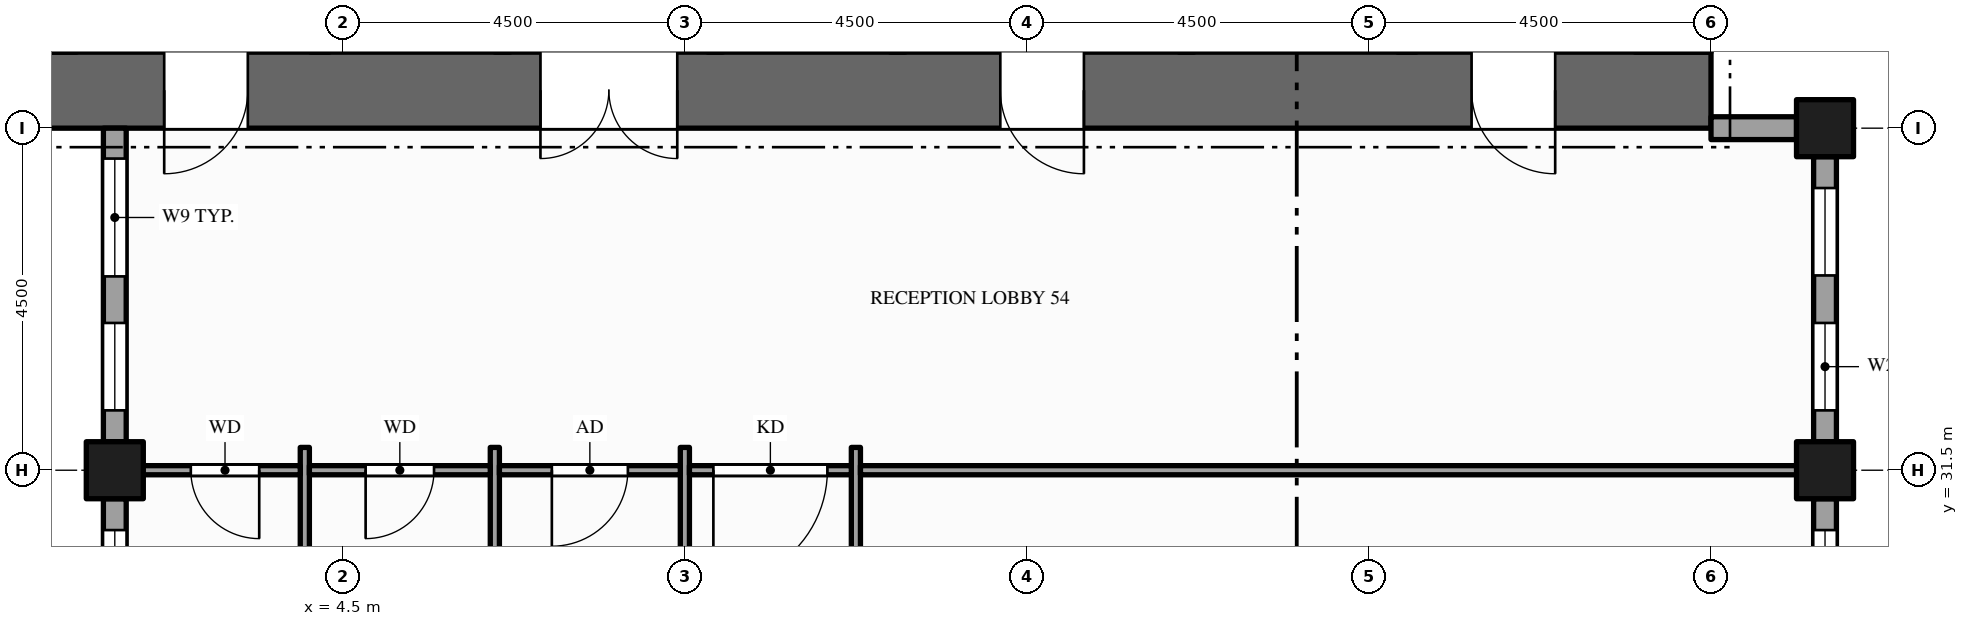
"""IFC4 building model, lengths in metres.
Left out: names, types, materials, properties, quantities, classifications, styles, units other than length and angle.
Written with IfcOpenShell. Run it as: python <this file> out.ifc"""

import sys

from ifc_helpers import new_model, si_unit, direction, frame, frame_2d, origin, origin_2d, place, context, subcontext, project, spatial, rectangle, hollow_rectangle, extrude, element, fill, save


model = new_model("IFC4")
c1 = context("Model", 3, precision=1e-05, world=origin(), true_north=direction((0.0, 1.0)))
c2 = subcontext(c1, "Body", "Model", "MODEL_VIEW")
j1 = project(units=[si_unit("LENGTHUNIT", "METRE"), si_unit("PLANEANGLEUNIT", "RADIAN")], contexts=[c1])
p1 = place(None, origin())
s1 = spatial("IfcSite", under=j1, at=p1, CompositionType="ELEMENT")
p2 = place(p1, origin())
s2 = spatial("IfcBuilding", under=s1, at=p2, CompositionType="ELEMENT")
p3 = place(p2, frame((0.0, 0.0, 199.0)))
s3 = spatial("IfcBuildingStorey", under=s2, at=p3, CompositionType="ELEMENT", Elevation=199.0)
p4 = place(p3, frame((0.0, 36.5, -0.15), z_axis=(0.0, 0.0, 1.0), x_axis=(1.0, 0.0, 0.0)))
e1 = element("IfcWall", 1, at=p4, inside=s3, PredefinedType="SHEAR", context=c2, shape_type="SweptSolid", body=[
    extrude(rectangle(XDim=22.5, YDim=1.0, at=frame_2d((11.25, 0.0))), origin(), (0.0, 0.0, 1.0), 4.0),
])
p5 = place(p4, frame((7.1, 0.0, 0.15)))
e2 = element("IfcOpeningElement", 2, at=p5, cuts=e1, PredefinedType="OPENING", context=c2, shape_type="SweptSolid", body=[
    extrude(rectangle(XDim=1.8, YDim=2.1, at=frame_2d((0.9, 1.05))), frame((0.0, 0.51, 0.0), z_axis=(0.0, -1.0, 0.0), x_axis=(1.0, 0.0, 0.0)), (0.0, 0.0, 1.0), 1.02),
])
p6 = place(p4, frame((13.15, 0.0, 0.15)))
e3 = element("IfcOpeningElement", 3, at=p6, cuts=e1, PredefinedType="OPENING", context=c2, shape_type="SweptSolid", body=[
    extrude(rectangle(XDim=1.1, YDim=2.1, at=frame_2d((0.55, 1.05))), frame((0.0, 0.51, 0.0), z_axis=(0.0, -1.0, 0.0), x_axis=(1.0, 0.0, 0.0)), (0.0, 0.0, 1.0), 1.02),
])
p7 = place(p4, frame((2.15, 0.0, 0.15)))
e4 = element("IfcOpeningElement", 4, at=p7, cuts=e1, PredefinedType="OPENING", context=c2, shape_type="SweptSolid", body=[
    extrude(rectangle(XDim=1.1, YDim=2.1, at=frame_2d((0.55, 1.05))), frame((0.0, 0.51, 0.0), z_axis=(0.0, -1.0, 0.0), x_axis=(1.0, 0.0, 0.0)), (0.0, 0.0, 1.0), 1.02),
])
p8 = place(p4, frame((19.35, 0.0, 0.15)))
e5 = element("IfcOpeningElement", 5, at=p8, cuts=e1, PredefinedType="OPENING", context=c2, shape_type="SweptSolid", body=[
    extrude(rectangle(XDim=1.1, YDim=2.1, at=frame_2d((0.55, 1.05))), frame((0.0, 0.51, 0.0), z_axis=(0.0, -1.0, 0.0), x_axis=(1.0, 0.0, 0.0)), (0.0, 0.0, 1.0), 1.02),
])
for number, where, z_axis, x_axis in (
    (6, (1.5, 31.5, -0.15), (0.0, 0.0, 1.0), (1.0, 0.0, 0.0)),
    (7, (24.0, 31.5, -0.15), (0.0, 0.0, 1.0), (1.0, 0.0, 0.0)),
    (8, (24.0, 36.0, -0.15), (0.0, 0.0, 1.0), (1.0, 0.0, 0.0)),
):
    element("IfcColumn", number, at=place(p3, frame(where, z_axis=z_axis, x_axis=x_axis)), inside=s3, PredefinedType="COLUMN", context=c2, shape_type="SweptSolid", body=[
        extrude(hollow_rectangle(XDim=0.75, YDim=0.75, WallThickness=0.036, at=origin_2d()), origin(), (0.0, 0.0, 1.0), 4.0),
    ])
p9 = place(p3, frame((24.0, 25.875, 0.0), z_axis=(0.0, 0.0, 1.0), x_axis=(0.0, 1.0, 0.0)))
e9 = element("IfcWall", 9, at=p9, inside=s3, PredefinedType="STANDARD", context=c2, shape_type="SweptSolid", body=[
    extrude(rectangle(XDim=5.25, YDim=0.3, at=frame_2d((2.625, 0.0))), origin(), (0.0, 0.0, 1.0), 3.157),
])
p10 = place(p9, frame((1.425, 0.0, 0.9)))
e10 = element("IfcOpeningElement", 10, at=p10, cuts=e9, PredefinedType="OPENING", context=c2, shape_type="SweptSolid", body=[
    extrude(rectangle(XDim=1.65, YDim=2.0, at=frame_2d((0.825, 1.0))), frame((0.0, 0.16, 0.0), z_axis=(0.0, -1.0, 0.0), x_axis=(1.0, 0.0, 0.0)), (0.0, 0.0, 1.0), 0.32),
])
p11 = place(p9, frame((3.688, 0.0, 0.9)))
e11 = element("IfcOpeningElement", 11, at=p11, cuts=e9, PredefinedType="OPENING", context=c2, shape_type="SweptSolid", body=[
    extrude(rectangle(XDim=1.15, YDim=2.0, at=frame_2d((0.575, 1.0))), frame((0.0, 0.16, 0.0), z_axis=(0.0, -1.0, 0.0), x_axis=(1.0, 0.0, 0.0)), (0.0, 0.0, 1.0), 0.32),
])
p12 = place(p3, frame((24.0, 31.875, 0.0), z_axis=(0.0, 0.0, 1.0), x_axis=(0.0, 1.0, 0.0)))
e12 = element("IfcWall", 12, at=p12, inside=s3, PredefinedType="STANDARD", context=c2, shape_type="SweptSolid", body=[
    extrude(rectangle(XDim=3.75, YDim=0.3, at=frame_2d((1.875, 0.0))), origin(), (0.0, 0.0, 1.0), 3.157),
])
p13 = place(p12, frame((0.413, 0.0, 0.9)))
e13 = element("IfcOpeningElement", 13, at=p13, cuts=e12, PredefinedType="OPENING", context=c2, shape_type="SweptSolid", body=[
    extrude(rectangle(XDim=1.15, YDim=2.0, at=frame_2d((0.575, 1.0))), frame((0.0, 0.16, 0.0), z_axis=(0.0, -1.0, 0.0), x_axis=(1.0, 0.0, 0.0)), (0.0, 0.0, 1.0), 0.32),
])
p14 = place(p12, frame((2.188, 0.0, 0.9)))
e14 = element("IfcOpeningElement", 14, at=p14, cuts=e12, PredefinedType="OPENING", context=c2, shape_type="SweptSolid", body=[
    extrude(rectangle(XDim=1.15, YDim=2.0, at=frame_2d((0.575, 1.0))), frame((0.0, 0.16, 0.0), z_axis=(0.0, -1.0, 0.0), x_axis=(1.0, 0.0, 0.0)), (0.0, 0.0, 1.0), 0.32),
])
p15 = place(p3, frame((23.625, 36.0, 0.0), z_axis=(0.0, 0.0, 1.0), x_axis=(-1.0, 0.0, 0.0)))
e15 = element("IfcWall", 15, at=p15, inside=s3, PredefinedType="STANDARD", context=c2, shape_type="SweptSolid", body=[
    extrude(rectangle(XDim=1.125, YDim=0.3, at=frame_2d((0.562, 0.0))), origin(), (0.0, 0.0, 1.0), 2.87),
])
p16 = place(p3, frame((1.5, 36.0, 0.0), z_axis=(0.0, 0.0, 1.0), x_axis=(0.0, -1.0, 0.0)))
e16 = element("IfcWall", 16, at=p16, inside=s3, PredefinedType="STANDARD", context=c2, shape_type="SweptSolid", body=[
    extrude(rectangle(XDim=4.125, YDim=0.3, at=frame_2d((2.062, 0.0))), origin(), (0.0, 0.0, 1.0), 3.157),
])
p17 = place(p16, frame((0.4, 0.0, 0.9)))
e17 = element("IfcOpeningElement", 17, at=p17, cuts=e16, PredefinedType="OPENING", context=c2, shape_type="SweptSolid", body=[
    extrude(rectangle(XDim=1.55, YDim=2.0, at=frame_2d((0.775, 1.0))), frame((0.0, 0.16, 0.0), z_axis=(0.0, -1.0, 0.0), x_axis=(1.0, 0.0, 0.0)), (0.0, 0.0, 1.0), 0.32),
])
p18 = place(p16, frame((2.562, 0.0, 0.9)))
e18 = element("IfcOpeningElement", 18, at=p18, cuts=e16, PredefinedType="OPENING", context=c2, shape_type="SweptSolid", body=[
    extrude(rectangle(XDim=1.15, YDim=2.0, at=frame_2d((0.575, 1.0))), frame((0.0, 0.16, 0.0), z_axis=(0.0, -1.0, 0.0), x_axis=(1.0, 0.0, 0.0)), (0.0, 0.0, 1.0), 0.32),
])
p19 = place(p3, frame((1.5, 31.125, 0.0), z_axis=(0.0, 0.0, 1.0), x_axis=(0.0, -1.0, 0.0)))
e19 = element("IfcWall", 19, at=p19, inside=s3, PredefinedType="STANDARD", context=c2, shape_type="SweptSolid", body=[
    extrude(rectangle(XDim=3.75, YDim=0.3, at=frame_2d((1.875, 0.0))), origin(), (0.0, 0.0, 1.0), 3.157),
])
p20 = place(p19, frame((0.413, 0.0, 0.9)))
e20 = element("IfcOpeningElement", 20, at=p20, cuts=e19, PredefinedType="OPENING", context=c2, shape_type="SweptSolid", body=[
    extrude(rectangle(XDim=1.15, YDim=2.0, at=frame_2d((0.575, 1.0))), frame((0.0, 0.16, 0.0), z_axis=(0.0, -1.0, 0.0), x_axis=(1.0, 0.0, 0.0)), (0.0, 0.0, 1.0), 0.32),
])
p21 = place(p19, frame((2.188, 0.0, 0.9)))
e21 = element("IfcOpeningElement", 21, at=p21, cuts=e19, PredefinedType="OPENING", context=c2, shape_type="SweptSolid", body=[
    extrude(rectangle(XDim=1.15, YDim=2.0, at=frame_2d((0.575, 1.0))), frame((0.0, 0.16, 0.0), z_axis=(0.0, -1.0, 0.0), x_axis=(1.0, 0.0, 0.0)), (0.0, 0.0, 1.0), 0.32),
])
for number, where, z_axis, x_axis in (
    (22, (4.0, 26.7, 0.0), (0.0, 0.0, 1.0), (0.0, 1.0, 0.0)),
    (23, (6.5, 26.7, 0.0), (0.0, 0.0, 1.0), (0.0, 1.0, 0.0)),
):
    element("IfcWall", number, at=place(p3, frame(where, z_axis=z_axis, x_axis=x_axis)), inside=s3, PredefinedType="PARTITIONING", context=c2, shape_type="SweptSolid", body=[
        extrude(rectangle(XDim=5.1, YDim=0.12, at=frame_2d((2.55, 0.0))), origin(), (0.0, 0.0, 1.0), 3.85),
    ])
p22 = place(p3, frame((9.0, 10.95, 0.0), z_axis=(0.0, 0.0, 1.0), x_axis=(0.0, 1.0, 0.0)))
e24 = element("IfcWall", 24, at=p22, inside=s3, PredefinedType="PARTITIONING", context=c2, shape_type="SweptSolid", body=[
    extrude(rectangle(XDim=20.85, YDim=0.12, at=frame_2d((10.425, 0.0))), origin(), (0.0, 0.0, 1.0), 2.6),
])
p23 = place(p22, frame((2.05, 0.0, 0.0)))
e25 = element("IfcOpeningElement", 25, at=p23, cuts=e24, PredefinedType="OPENING", context=c2, shape_type="SweptSolid", body=[
    extrude(rectangle(XDim=1.0, YDim=2.1, at=frame_2d((0.5, 1.05))), frame((0.0, 0.07, 0.0), z_axis=(0.0, -1.0, 0.0), x_axis=(1.0, 0.0, 0.0)), (0.0, 0.0, 1.0), 0.14),
])
p24 = place(p22, frame((6.55, 0.0, 0.0)))
e26 = element("IfcOpeningElement", 26, at=p24, cuts=e24, PredefinedType="OPENING", context=c2, shape_type="SweptSolid", body=[
    extrude(rectangle(XDim=1.0, YDim=2.1, at=frame_2d((0.5, 1.05))), frame((0.0, 0.07, 0.0), z_axis=(0.0, -1.0, 0.0), x_axis=(1.0, 0.0, 0.0)), (0.0, 0.0, 1.0), 0.14),
])
p25 = place(p22, frame((12.205, 0.0, 0.0)))
e27 = element("IfcOpeningElement", 27, at=p25, cuts=e24, PredefinedType="OPENING", context=c2, shape_type="SweptSolid", body=[
    extrude(rectangle(XDim=1.0, YDim=2.1, at=frame_2d((0.5, 1.05))), frame((0.0, 0.07, 0.0), z_axis=(0.0, -1.0, 0.0), x_axis=(1.0, 0.0, 0.0)), (0.0, 0.0, 1.0), 0.14),
])
p26 = place(p3, frame((11.25, 10.95, 0.0), z_axis=(0.0, 0.0, 1.0), x_axis=(0.0, 1.0, 0.0)))
e28 = element("IfcWall", 28, at=p26, inside=s3, PredefinedType="PARTITIONING", context=c2, shape_type="SweptSolid", body=[
    extrude(rectangle(XDim=20.85, YDim=0.12, at=frame_2d((10.425, 0.0))), origin(), (0.0, 0.0, 1.0), 2.6),
])
p27 = place(p26, frame((17.8, 0.0, 0.0)))
e29 = element("IfcOpeningElement", 29, at=p27, cuts=e28, PredefinedType="OPENING", context=c2, shape_type="SweptSolid", body=[
    extrude(rectangle(XDim=1.0, YDim=2.1, at=frame_2d((0.5, 1.05))), frame((0.0, 0.07, 0.0), z_axis=(0.0, -1.0, 0.0), x_axis=(1.0, 0.0, 0.0)), (0.0, 0.0, 1.0), 0.14),
])
p28 = place(p26, frame((4.2, 0.0, 0.0)))
e30 = element("IfcOpeningElement", 30, at=p28, cuts=e28, PredefinedType="OPENING", context=c2, shape_type="SweptSolid", body=[
    extrude(rectangle(XDim=1.2, YDim=2.1, at=frame_2d((0.6, 1.05))), frame((0.0, 0.07, 0.0), z_axis=(0.0, -1.0, 0.0), x_axis=(1.0, 0.0, 0.0)), (0.0, 0.0, 1.0), 0.14),
])
p29 = place(p3, frame((1.65, 31.5, 0.0), z_axis=(0.0, 0.0, 1.0), x_axis=(1.0, 0.0, 0.0)))
e31 = element("IfcWall", 31, at=p29, inside=s3, PredefinedType="PARTITIONING", context=c2, shape_type="SweptSolid", body=[
    extrude(rectangle(XDim=2.29, YDim=0.12, at=frame_2d((1.145, 0.0))), origin(), (0.0, 0.0, 1.0), 2.87),
])
p30 = place(p29, frame((0.85, 0.0, 0.0)))
e32 = element("IfcOpeningElement", 32, at=p30, cuts=e31, PredefinedType="OPENING", context=c2, shape_type="SweptSolid", body=[
    extrude(rectangle(XDim=0.9, YDim=2.1, at=frame_2d((0.45, 1.05))), frame((0.0, 0.07, 0.0), z_axis=(0.0, -1.0, 0.0), x_axis=(1.0, 0.0, 0.0)), (0.0, 0.0, 1.0), 0.14),
])
p31 = place(p3, frame((4.06, 31.5, 0.0), z_axis=(0.0, 0.0, 1.0), x_axis=(1.0, 0.0, 0.0)))
e33 = element("IfcWall", 33, at=p31, inside=s3, PredefinedType="PARTITIONING", context=c2, shape_type="SweptSolid", body=[
    extrude(rectangle(XDim=2.38, YDim=0.12, at=frame_2d((1.19, 0.0))), origin(), (0.0, 0.0, 1.0), 2.87),
])
p32 = place(p31, frame((0.74, 0.0, 0.0)))
e34 = element("IfcOpeningElement", 34, at=p32, cuts=e33, PredefinedType="OPENING", context=c2, shape_type="SweptSolid", body=[
    extrude(rectangle(XDim=0.9, YDim=2.1, at=frame_2d((0.45, 1.05))), frame((0.0, 0.07, 0.0), z_axis=(0.0, -1.0, 0.0), x_axis=(1.0, 0.0, 0.0)), (0.0, 0.0, 1.0), 0.14),
])
p33 = place(p3, frame((6.56, 31.5, 0.0), z_axis=(0.0, 0.0, 1.0), x_axis=(1.0, 0.0, 0.0)))
e35 = element("IfcWall", 35, at=p33, inside=s3, PredefinedType="PARTITIONING", context=c2, shape_type="SweptSolid", body=[
    extrude(rectangle(XDim=2.38, YDim=0.12, at=frame_2d((1.19, 0.0))), origin(), (0.0, 0.0, 1.0), 2.87),
])
p34 = place(p33, frame((0.69, 0.0, 0.0)))
e36 = element("IfcOpeningElement", 36, at=p34, cuts=e35, PredefinedType="OPENING", context=c2, shape_type="SweptSolid", body=[
    extrude(rectangle(XDim=1.0, YDim=2.1, at=frame_2d((0.5, 1.05))), frame((0.0, 0.07, 0.0), z_axis=(0.0, -1.0, 0.0), x_axis=(1.0, 0.0, 0.0)), (0.0, 0.0, 1.0), 0.14),
])
p35 = place(p3, frame((9.06, 31.5, 0.0), z_axis=(0.0, 0.0, 1.0), x_axis=(1.0, 0.0, 0.0)))
e37 = element("IfcWall", 37, at=p35, inside=s3, PredefinedType="PARTITIONING", context=c2, shape_type="SweptSolid", body=[
    extrude(rectangle(XDim=2.13, YDim=0.12, at=frame_2d((1.065, 0.0))), origin(), (0.0, 0.0, 1.0), 2.87),
])
p36 = place(p35, frame((0.315, 0.0, 0.0)))
e38 = element("IfcOpeningElement", 38, at=p36, cuts=e37, PredefinedType="OPENING", context=c2, shape_type="SweptSolid", body=[
    extrude(rectangle(XDim=1.5, YDim=2.1, at=frame_2d((0.75, 1.05))), frame((0.0, 0.07, 0.0), z_axis=(0.0, -1.0, 0.0), x_axis=(1.0, 0.0, 0.0)), (0.0, 0.0, 1.0), 0.14),
])
p37 = place(p3, frame((11.31, 31.5, 0.0), z_axis=(0.0, 0.0, 1.0), x_axis=(1.0, 0.0, 0.0)))
e39 = element("IfcWall", 39, at=p37, inside=s3, PredefinedType="PARTITIONING", context=c2, shape_type="SweptSolid", body=[
    extrude(rectangle(XDim=12.54, YDim=0.12, at=frame_2d((6.27, 0.0))), origin(), (0.0, 0.0, 1.0), 2.87),
])
p38 = place(p11, origin())
e40 = element("IfcWindow", 40, at=p38, inside=s3, PartitioningType="SINGLE_PANEL", PredefinedType="WINDOW", context=c2, shape_type="SweptSolid", body=[
    extrude(rectangle(XDim=1.15, YDim=2.0, at=frame_2d((0.575, 1.0))), frame((0.0, 0.03, 0.0), z_axis=(0.0, -1.0, 0.0), x_axis=(1.0, 0.0, 0.0)), (0.0, 0.0, 1.0), 0.06),
])
fill(e11, e40)
p39 = place(p13, origin())
e41 = element("IfcWindow", 41, at=p39, inside=s3, PartitioningType="SINGLE_PANEL", PredefinedType="WINDOW", context=c2, shape_type="SweptSolid", body=[
    extrude(rectangle(XDim=1.15, YDim=2.0, at=frame_2d((0.575, 1.0))), frame((0.0, 0.03, 0.0), z_axis=(0.0, -1.0, 0.0), x_axis=(1.0, 0.0, 0.0)), (0.0, 0.0, 1.0), 0.06),
])
fill(e13, e41)
p40 = place(p14, origin())
e42 = element("IfcWindow", 42, at=p40, inside=s3, PartitioningType="SINGLE_PANEL", PredefinedType="WINDOW", context=c2, shape_type="SweptSolid", body=[
    extrude(rectangle(XDim=1.15, YDim=2.0, at=frame_2d((0.575, 1.0))), frame((0.0, 0.03, 0.0), z_axis=(0.0, -1.0, 0.0), x_axis=(1.0, 0.0, 0.0)), (0.0, 0.0, 1.0), 0.06),
])
fill(e14, e42)
p41 = place(p17, origin())
e43 = element("IfcWindow", 43, at=p41, inside=s3, PartitioningType="SINGLE_PANEL", PredefinedType="WINDOW", context=c2, shape_type="SweptSolid", body=[
    extrude(rectangle(XDim=1.55, YDim=2.0, at=frame_2d((0.775, 1.0))), frame((0.0, 0.03, 0.0), z_axis=(0.0, -1.0, 0.0), x_axis=(1.0, 0.0, 0.0)), (0.0, 0.0, 1.0), 0.06),
])
fill(e17, e43)
p42 = place(p18, origin())
e44 = element("IfcWindow", 44, at=p42, inside=s3, PartitioningType="SINGLE_PANEL", PredefinedType="WINDOW", context=c2, shape_type="SweptSolid", body=[
    extrude(rectangle(XDim=1.15, YDim=2.0, at=frame_2d((0.575, 1.0))), frame((0.0, 0.03, 0.0), z_axis=(0.0, -1.0, 0.0), x_axis=(1.0, 0.0, 0.0)), (0.0, 0.0, 1.0), 0.06),
])
fill(e18, e44)
p43 = place(p20, origin())
e45 = element("IfcWindow", 45, at=p43, inside=s3, PartitioningType="SINGLE_PANEL", PredefinedType="WINDOW", context=c2, shape_type="SweptSolid", body=[
    extrude(rectangle(XDim=1.15, YDim=2.0, at=frame_2d((0.575, 1.0))), frame((0.0, 0.03, 0.0), z_axis=(0.0, -1.0, 0.0), x_axis=(1.0, 0.0, 0.0)), (0.0, 0.0, 1.0), 0.06),
])
fill(e20, e45)
p44 = place(p5, origin())
e46 = element("IfcDoor", 46, at=p44, inside=s3, OperationType="DOUBLE_DOOR_SINGLE_SWING", PredefinedType="DOOR", context=c2, shape_type="SweptSolid", body=[
    extrude(rectangle(XDim=1.8, YDim=2.1, at=frame_2d((0.9, 1.05))), frame((0.0, 0.025, 0.0), z_axis=(0.0, -1.0, 0.0), x_axis=(1.0, 0.0, 0.0)), (0.0, 0.0, 1.0), 0.05),
])
fill(e2, e46)
p45 = place(p6, origin())
e47 = element("IfcDoor", 47, at=p45, inside=s3, OperationType="SINGLE_SWING_RIGHT", PredefinedType="DOOR", context=c2, shape_type="SweptSolid", body=[
    extrude(rectangle(XDim=1.1, YDim=2.1, at=frame_2d((0.55, 1.05))), frame((0.0, 0.025, 0.0), z_axis=(0.0, -1.0, 0.0), x_axis=(1.0, 0.0, 0.0)), (0.0, 0.0, 1.0), 0.05),
])
fill(e3, e47)
p46 = place(p7, origin())
e48 = element("IfcDoor", 48, at=p46, inside=s3, OperationType="SINGLE_SWING_LEFT", PredefinedType="DOOR", context=c2, shape_type="SweptSolid", body=[
    extrude(rectangle(XDim=1.1, YDim=2.1, at=frame_2d((0.55, 1.05))), frame((0.0, 0.025, 0.0), z_axis=(0.0, -1.0, 0.0), x_axis=(1.0, 0.0, 0.0)), (0.0, 0.0, 1.0), 0.05),
])
fill(e4, e48)
p47 = place(p8, origin())
e49 = element("IfcDoor", 49, at=p47, inside=s3, OperationType="SINGLE_SWING_RIGHT", PredefinedType="DOOR", context=c2, shape_type="SweptSolid", body=[
    extrude(rectangle(XDim=1.1, YDim=2.1, at=frame_2d((0.55, 1.05))), frame((0.0, 0.025, 0.0), z_axis=(0.0, -1.0, 0.0), x_axis=(1.0, 0.0, 0.0)), (0.0, 0.0, 1.0), 0.05),
])
fill(e5, e49)
p48 = place(p36, origin())
e50 = element("IfcDoor", 50, at=p48, inside=s3, OperationType="SINGLE_SWING_LEFT", PredefinedType="DOOR", context=c2, shape_type="SweptSolid", body=[
    extrude(rectangle(XDim=1.5, YDim=2.1, at=frame_2d((0.75, 1.05))), frame((0.0, 0.025, 0.0), z_axis=(0.0, -1.0, 0.0), x_axis=(1.0, 0.0, 0.0)), (0.0, 0.0, 1.0), 0.05),
])
fill(e38, e50)
p49 = place(p30, origin())
e51 = element("IfcDoor", 51, at=p49, inside=s3, OperationType="SINGLE_SWING_RIGHT", PredefinedType="DOOR", context=c2, shape_type="SweptSolid", body=[
    extrude(rectangle(XDim=0.9, YDim=2.1, at=frame_2d((0.45, 1.05))), frame((0.0, 0.025, 0.0), z_axis=(0.0, -1.0, 0.0), x_axis=(1.0, 0.0, 0.0)), (0.0, 0.0, 1.0), 0.05),
])
fill(e32, e51)
p50 = place(p32, origin())
e52 = element("IfcDoor", 52, at=p50, inside=s3, OperationType="SINGLE_SWING_LEFT", PredefinedType="DOOR", context=c2, shape_type="SweptSolid", body=[
    extrude(rectangle(XDim=0.9, YDim=2.1, at=frame_2d((0.45, 1.05))), frame((0.0, 0.025, 0.0), z_axis=(0.0, -1.0, 0.0), x_axis=(1.0, 0.0, 0.0)), (0.0, 0.0, 1.0), 0.05),
])
fill(e34, e52)
p51 = place(p34, origin())
e53 = element("IfcDoor", 53, at=p51, inside=s3, OperationType="SINGLE_SWING_LEFT", PredefinedType="DOOR", context=c2, shape_type="SweptSolid", body=[
    extrude(rectangle(XDim=1.0, YDim=2.1, at=frame_2d((0.5, 1.05))), frame((0.0, 0.025, 0.0), z_axis=(0.0, -1.0, 0.0), x_axis=(1.0, 0.0, 0.0)), (0.0, 0.0, 1.0), 0.05),
])
fill(e36, e53)
save(model, sys.argv[1])
